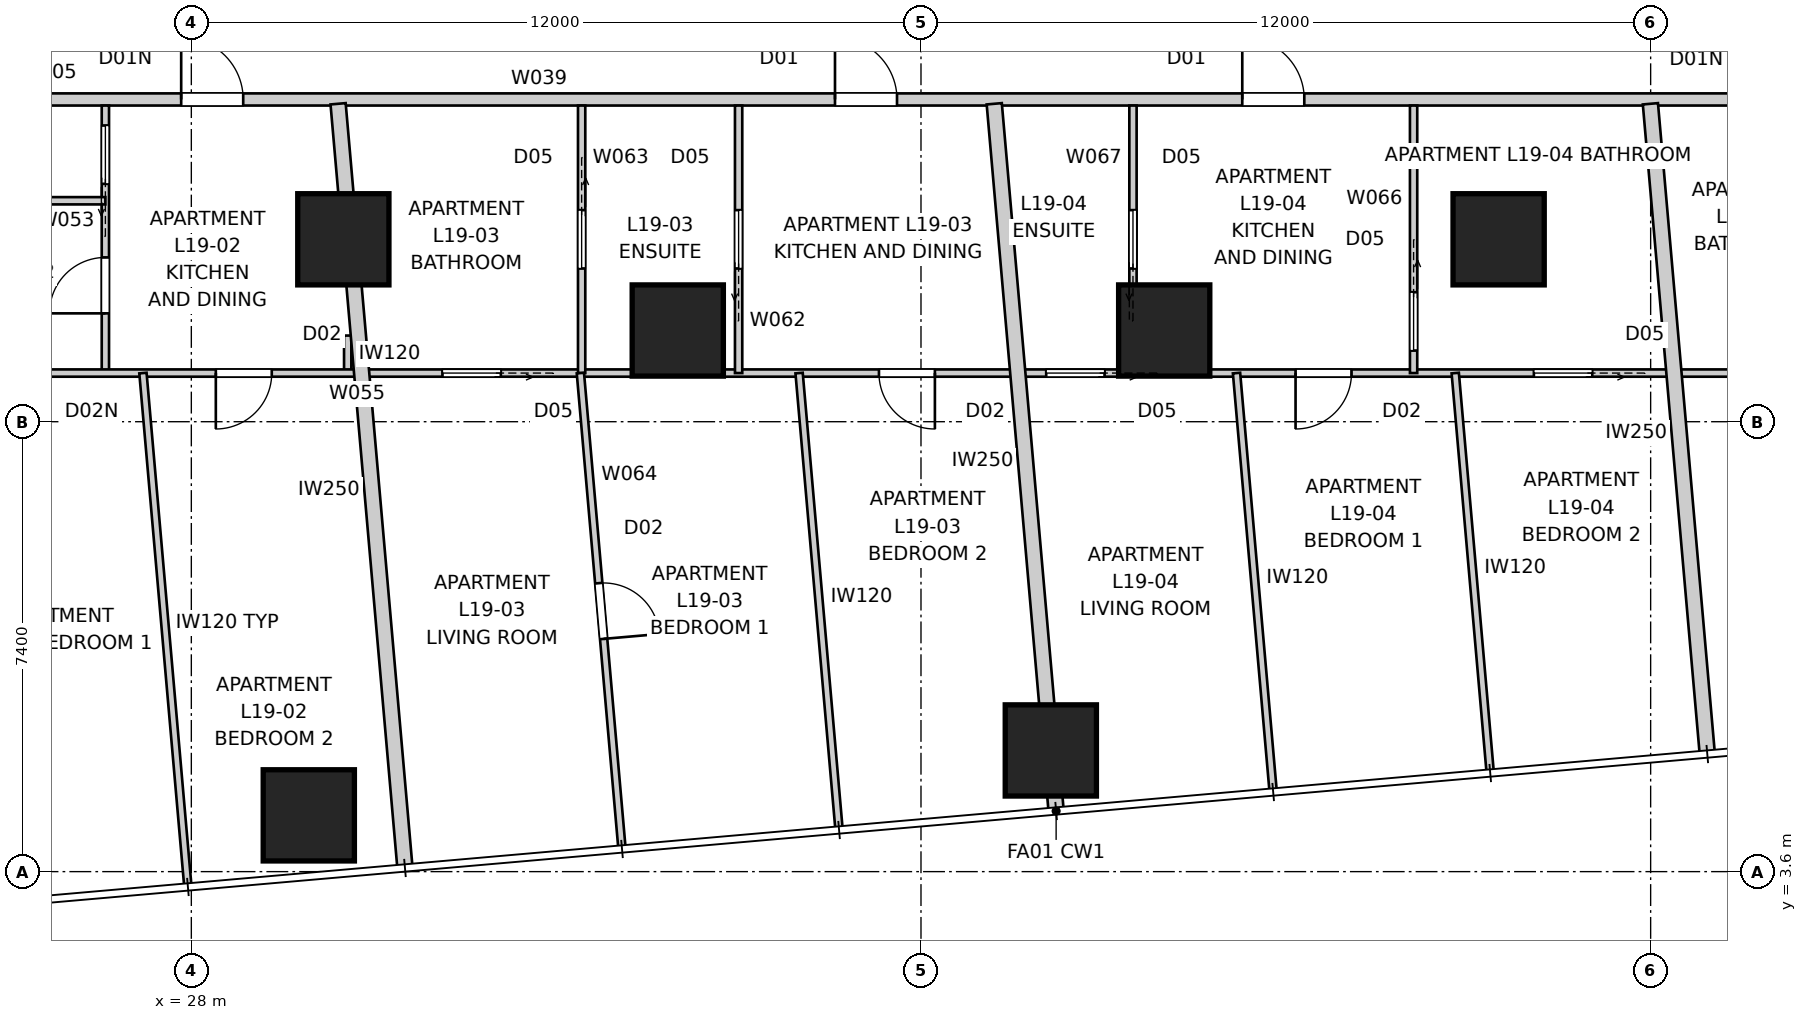
"""IFC4 building model, lengths in metres.
Left out: names, types, materials, properties, quantities, classifications, styles, units other than length and angle.
Written with IfcOpenShell. Run it as: python <this file> out.ifc"""

import sys

from ifc_helpers import new_model, si_unit, direction, frame, frame_2d, origin, origin_2d, place, context, subcontext, project, spatial, rectangle, extrude, element, fill, save


model = new_model("IFC4")
c1 = context("Model", 3, precision=1e-05, world=origin(), true_north=direction((0.0, 1.0)))
c2 = subcontext(c1, "Body", "Model", "MODEL_VIEW")
j1 = project(units=[si_unit("LENGTHUNIT", "METRE"), si_unit("PLANEANGLEUNIT", "RADIAN")], contexts=[c1])
p1 = place(None, origin())
s1 = spatial("IfcSite", under=j1, at=p1, CompositionType="ELEMENT")
p2 = place(p1, origin())
s2 = spatial("IfcBuilding", under=s1, at=p2, CompositionType="ELEMENT")
p3 = place(p2, frame((0.0, 0.0, 71.0)))
s3 = spatial("IfcBuildingStorey", under=s2, at=p3, CompositionType="ELEMENT", Elevation=71.0)
for number, where, z_axis, x_axis in (
    (1, (29.932, 4.526, 0.0), (0.0, 0.0, 1.0), (1.0, 0.0, 0.0)),
    (2, (42.135, 5.593, 0.0), (0.0, 0.0, 1.0), (1.0, 0.0, 0.0)),
):
    element("IfcColumn", number, at=place(p3, frame(where, z_axis=z_axis, x_axis=x_axis)), inside=s3, PredefinedType="COLUMN", context=c2, shape_type="SweptSolid", body=[
        extrude(rectangle(XDim=1.5, YDim=1.5, at=origin_2d()), origin(), (0.0, 0.0, 1.0), 3.2),
    ])
for number, where, z_axis, x_axis in (
    (3, (30.5, 14.0, 0.0), (0.0, 0.0, 1.0), (1.0, 0.0, 0.0)),
    (4, (36.0, 12.5, 0.0), (0.0, 0.0, 1.0), (1.0, 0.0, 0.0)),
    (5, (44.0, 12.5, 0.0), (0.0, 0.0, 1.0), (1.0, 0.0, 0.0)),
    (6, (49.5, 14.0, 0.0), (0.0, 0.0, 1.0), (1.0, 0.0, 0.0)),
):
    element("IfcColumn", number, at=place(p3, frame(where, z_axis=z_axis, x_axis=x_axis)), inside=s3, PredefinedType="COLUMN", context=c2, shape_type="SweptSolid", body=[
        extrude(rectangle(XDim=1.5, YDim=1.5, at=origin_2d()), origin(), (0.0, 0.0, 1.0), 3.4),
    ])
p4 = place(p3, frame((25.5, 16.3, 0.0), z_axis=(0.0, 0.0, 1.0), x_axis=(1.0, 0.0, 0.0)))
e7 = element("IfcWall", 7, at=p4, inside=s3, PredefinedType="PARTITIONING", context=c2, shape_type="SweptSolid", body=[
    extrude(rectangle(XDim=28.2, YDim=0.2, at=frame_2d((14.1, 0.0))), origin(), (0.0, 0.0, 1.0), 3.2),
])
p5 = place(p4, frame((19.784, 0.0, 0.0)))
e8 = element("IfcOpeningElement", 8, at=p5, cuts=e7, PredefinedType="OPENING", context=c2, shape_type="SweptSolid", body=[
    extrude(rectangle(XDim=1.02, YDim=2.34, at=frame_2d((0.51, 1.17))), frame((0.0, 0.11, 0.0), z_axis=(0.0, -1.0, 0.0), x_axis=(1.0, 0.0, 0.0)), (0.0, 0.0, 1.0), 0.22),
])
p6 = place(p4, frame((13.086, 0.0, 0.0)))
e9 = element("IfcOpeningElement", 9, at=p6, cuts=e7, PredefinedType="OPENING", context=c2, shape_type="SweptSolid", body=[
    extrude(rectangle(XDim=1.02, YDim=2.34, at=frame_2d((0.51, 1.17))), frame((0.0, 0.11, 0.0), z_axis=(0.0, -1.0, 0.0), x_axis=(1.0, 0.0, 0.0)), (0.0, 0.0, 1.0), 0.22),
])
p7 = place(p4, frame((2.333, 0.0, 0.0)))
e10 = element("IfcOpeningElement", 10, at=p7, cuts=e7, PredefinedType="OPENING", context=c2, shape_type="SweptSolid", body=[
    extrude(rectangle(XDim=1.02, YDim=2.0, at=frame_2d((0.51, 1.0))), frame((0.0, 0.11, 0.0), z_axis=(0.0, -1.0, 0.0), x_axis=(1.0, 0.0, 0.0)), (0.0, 0.0, 1.0), 0.22),
])
p8 = place(p3, frame((42.222, 4.597, 0.0), z_axis=(0.0, 0.0, 1.0), x_axis=(-0.087147497287, 0.996195419442, 0.0)))
e11 = element("IfcWall", 11, at=p8, inside=s3, PredefinedType="PARTITIONING", context=c2, shape_type="SweptSolid", body=[
    extrude(rectangle(XDim=11.677, YDim=0.25, at=frame_2d((5.838, 0.0))), origin(), (0.0, 0.0, 1.0), 3.2),
])
p9 = place(p3, frame((52.932, 5.534, 0.0), z_axis=(0.0, 0.0, 1.0), x_axis=(-0.08716441141, 0.996193939644, 0.0)))
e12 = element("IfcWall", 12, at=p9, inside=s3, PredefinedType="PARTITIONING", context=c2, shape_type="SweptSolid", body=[
    extrude(rectangle(XDim=10.736, YDim=0.25, at=frame_2d((5.368, 0.0))), origin(), (0.0, 0.0, 1.0), 3.2),
])
p10 = place(p3, frame((31.513, 3.66, 0.0), z_axis=(0.0, 0.0, 1.0), x_axis=(-0.087153988028, 0.996194851608, 0.0)))
e13 = element("IfcWall", 13, at=p10, inside=s3, PredefinedType="PARTITIONING", context=c2, shape_type="SweptSolid", body=[
    extrude(rectangle(XDim=12.617, YDim=0.25, at=frame_2d((6.309, 0.0))), origin(), (0.0, 0.0, 1.0), 3.2),
])
p11 = place(p3, frame((26.586, 11.8, 0.0), z_axis=(0.0, 0.0, 1.0), x_axis=(0.0, 1.0, 0.0)))
e14 = element("IfcWall", 14, at=p11, inside=s3, PredefinedType="PARTITIONING", context=c2, shape_type="SweptSolid", body=[
    extrude(rectangle(XDim=4.4, YDim=0.12, at=frame_2d((2.2, 0.0))), origin(), (0.0, 0.0, 1.0), 3.2),
])
p12 = place(p11, frame((0.982, 0.0, 0.0)))
e15 = element("IfcOpeningElement", 15, at=p12, cuts=e14, PredefinedType="OPENING", context=c2, shape_type="SweptSolid", body=[
    extrude(rectangle(XDim=0.92, YDim=2.0, at=frame_2d((0.46, 1.0))), frame((0.0, 0.07, 0.0), z_axis=(0.0, -1.0, 0.0), x_axis=(1.0, 0.0, 0.0)), (0.0, 0.0, 1.0), 0.14),
])
p13 = place(p11, frame((3.112, 0.0, 0.0)))
e16 = element("IfcOpeningElement", 16, at=p13, cuts=e14, PredefinedType="OPENING", context=c2, shape_type="SweptSolid", body=[
    extrude(rectangle(XDim=0.96, YDim=2.1, at=frame_2d((0.48, 1.05))), frame((0.0, 0.07, 0.0), z_axis=(0.0, -1.0, 0.0), x_axis=(1.0, 0.0, 0.0)), (0.0, 0.0, 1.0), 0.14),
])
p14 = place(p3, frame((30.572, 12.417, 0.0), z_axis=(0.0, 0.0, 1.0), x_axis=(0.0, -1.0, 0.0)))
e17 = element("IfcWall", 17, at=p14, inside=s3, PredefinedType="PARTITIONING", context=c2, shape_type="SweptSolid", body=[
    extrude(rectangle(XDim=0.617, YDim=0.12, at=frame_2d((0.308, 0.0))), origin(), (0.0, 0.0, 1.0), 3.2),
])
p15 = place(p3, frame((58.2, 11.8, 0.0), z_axis=(0.0, 0.0, 1.0), x_axis=(-1.0, 0.0, 0.0)))
e18 = element("IfcWall", 18, at=p15, inside=s3, PredefinedType="PARTITIONING", context=c2, shape_type="SweptSolid", body=[
    extrude(rectangle(XDim=36.4, YDim=0.12, at=frame_2d((18.2, 0.0))), origin(), (0.0, 0.0, 1.0), 3.2),
])
p16 = place(p15, frame((11.12, 0.0, 0.0)))
e19 = element("IfcOpeningElement", 19, at=p16, cuts=e18, PredefinedType="OPENING", context=c2, shape_type="SweptSolid", body=[
    extrude(rectangle(XDim=0.92, YDim=2.34, at=frame_2d((0.46, 1.17))), frame((0.0, 0.07, 0.0), z_axis=(0.0, -1.0, 0.0), x_axis=(1.0, 0.0, 0.0)), (0.0, 0.0, 1.0), 0.14),
])
p17 = place(p15, frame((17.971, 0.0, 0.0)))
e20 = element("IfcOpeningElement", 20, at=p17, cuts=e18, PredefinedType="OPENING", context=c2, shape_type="SweptSolid", body=[
    extrude(rectangle(XDim=0.92, YDim=2.34, at=frame_2d((0.46, 1.17))), frame((0.0, 0.07, 0.0), z_axis=(0.0, -1.0, 0.0), x_axis=(1.0, 0.0, 0.0)), (0.0, 0.0, 1.0), 0.14),
])
p18 = place(p15, frame((28.877, 0.0, 0.0)))
e21 = element("IfcOpeningElement", 21, at=p18, cuts=e18, PredefinedType="OPENING", context=c2, shape_type="SweptSolid", body=[
    extrude(rectangle(XDim=0.92, YDim=2.34, at=frame_2d((0.46, 1.17))), frame((0.0, 0.07, 0.0), z_axis=(0.0, -1.0, 0.0), x_axis=(1.0, 0.0, 0.0)), (0.0, 0.0, 1.0), 0.14),
])
p19 = place(p15, frame((7.16, 0.0, 0.0)))
e22 = element("IfcOpeningElement", 22, at=p19, cuts=e18, PredefinedType="OPENING", context=c2, shape_type="SweptSolid", body=[
    extrude(rectangle(XDim=0.96, YDim=2.1, at=frame_2d((0.48, 1.05))), frame((0.0, 0.07, 0.0), z_axis=(0.0, -1.0, 0.0), x_axis=(1.0, 0.0, 0.0)), (0.0, 0.0, 1.0), 0.14),
])
p20 = place(p15, frame((15.181, 0.0, 0.0)))
e23 = element("IfcOpeningElement", 23, at=p20, cuts=e18, PredefinedType="OPENING", context=c2, shape_type="SweptSolid", body=[
    extrude(rectangle(XDim=0.96, YDim=2.1, at=frame_2d((0.48, 1.05))), frame((0.0, 0.07, 0.0), z_axis=(0.0, -1.0, 0.0), x_axis=(1.0, 0.0, 0.0)), (0.0, 0.0, 1.0), 0.14),
])
p21 = place(p15, frame((32.668, 0.0, 0.0)))
e24 = element("IfcOpeningElement", 24, at=p21, cuts=e18, PredefinedType="OPENING", context=c2, shape_type="SweptSolid", body=[
    extrude(rectangle(XDim=0.92, YDim=2.0, at=frame_2d((0.46, 1.0))), frame((0.0, 0.07, 0.0), z_axis=(0.0, -1.0, 0.0), x_axis=(1.0, 0.0, 0.0)), (0.0, 0.0, 1.0), 0.14),
])
p22 = place(p15, frame((35.011, 0.0, 0.0)))
e25 = element("IfcOpeningElement", 25, at=p22, cuts=e18, PredefinedType="OPENING", context=c2, shape_type="SweptSolid", body=[
    extrude(rectangle(XDim=0.92, YDim=2.34, at=frame_2d((0.46, 1.17))), frame((0.0, 0.07, 0.0), z_axis=(0.0, -1.0, 0.0), x_axis=(1.0, 0.0, 0.0)), (0.0, 0.0, 1.0), 0.14),
])
p23 = place(p15, frame((0.675, 0.0, 0.0)))
e26 = element("IfcOpeningElement", 26, at=p23, cuts=e18, PredefinedType="OPENING", context=c2, shape_type="SweptSolid", body=[
    extrude(rectangle(XDim=0.92, YDim=2.34, at=frame_2d((0.46, 1.17))), frame((0.0, 0.07, 0.0), z_axis=(0.0, -1.0, 0.0), x_axis=(1.0, 0.0, 0.0)), (0.0, 0.0, 1.0), 0.14),
])
p24 = place(p15, frame((25.11, 0.0, 0.0)))
e27 = element("IfcOpeningElement", 27, at=p24, cuts=e18, PredefinedType="OPENING", context=c2, shape_type="SweptSolid", body=[
    extrude(rectangle(XDim=0.96, YDim=2.1, at=frame_2d((0.48, 1.05))), frame((0.0, 0.07, 0.0), z_axis=(0.0, -1.0, 0.0), x_axis=(1.0, 0.0, 0.0)), (0.0, 0.0, 1.0), 0.14),
])
p25 = place(p15, frame((3.904, 0.0, 0.0)))
e28 = element("IfcOpeningElement", 28, at=p25, cuts=e18, PredefinedType="OPENING", context=c2, shape_type="SweptSolid", body=[
    extrude(rectangle(XDim=0.96, YDim=2.1, at=frame_2d((0.48, 1.05))), frame((0.0, 0.07, 0.0), z_axis=(0.0, -1.0, 0.0), x_axis=(1.0, 0.0, 0.0)), (0.0, 0.0, 1.0), 0.14),
])
p26 = place(p3, frame((26.586, 14.634, 0.0), z_axis=(0.0, 0.0, 1.0), x_axis=(-1.0, 0.0, 0.0)))
e29 = element("IfcWall", 29, at=p26, inside=s3, PredefinedType="PARTITIONING", context=c2, shape_type="SweptSolid", body=[
    extrude(rectangle(XDim=4.786, YDim=0.12, at=frame_2d((2.393, 0.0))), origin(), (0.0, 0.0, 1.0), 2.399),
])
p27 = place(p3, frame((27.204, 11.8, 0.0), z_axis=(0.0, 0.0, 1.0), x_axis=(0.087167308925, -0.996193686115, 0.0)))
e30 = element("IfcWall", 30, at=p27, inside=s3, PredefinedType="PARTITIONING", context=c2, shape_type="SweptSolid", body=[
    extrude(rectangle(XDim=8.445, YDim=0.12, at=frame_2d((4.222, 0.0))), origin(), (0.0, 0.0, 1.0), 2.399),
])
p28 = place(p3, frame((37.0, 11.8, 0.0), z_axis=(0.0, 0.0, 1.0), x_axis=(0.0, 1.0, 0.0)))
e31 = element("IfcWall", 31, at=p28, inside=s3, PredefinedType="PARTITIONING", context=c2, shape_type="SweptSolid", body=[
    extrude(rectangle(XDim=4.4, YDim=0.12, at=frame_2d((2.2, 0.0))), origin(), (0.0, 0.0, 1.0), 2.672),
])
p29 = place(p28, frame((1.72, 0.0, 0.0)))
e32 = element("IfcOpeningElement", 32, at=p29, cuts=e31, PredefinedType="OPENING", context=c2, shape_type="SweptSolid", body=[
    extrude(rectangle(XDim=0.96, YDim=2.1, at=frame_2d((0.48, 1.05))), frame((0.0, 0.07, 0.0), z_axis=(0.0, -1.0, 0.0), x_axis=(1.0, 0.0, 0.0)), (0.0, 0.0, 1.0), 0.14),
])
p30 = place(p3, frame((34.419, 16.2, 0.0), z_axis=(0.0, 0.0, 1.0), x_axis=(0.0, -1.0, 0.0)))
e33 = element("IfcWall", 33, at=p30, inside=s3, PredefinedType="PARTITIONING", context=c2, shape_type="SweptSolid", body=[
    extrude(rectangle(XDim=4.4, YDim=0.12, at=frame_2d((2.2, 0.0))), origin(), (0.0, 0.0, 1.0), 2.588),
])
p31 = place(p30, frame((1.72, 0.0, 0.0)))
e34 = element("IfcOpeningElement", 34, at=p31, cuts=e33, PredefinedType="OPENING", context=c2, shape_type="SweptSolid", body=[
    extrude(rectangle(XDim=0.96, YDim=2.1, at=frame_2d((0.48, 1.05))), frame((0.0, 0.07, 0.0), z_axis=(0.0, -1.0, 0.0), x_axis=(1.0, 0.0, 0.0)), (0.0, 0.0, 1.0), 0.14),
])
p32 = place(p3, frame((34.398, 11.8, 0.0), z_axis=(0.0, 0.0, 1.0), x_axis=(0.087161914023, -0.996194158156, 0.0)))
e35 = element("IfcWall", 35, at=p32, inside=s3, PredefinedType="PARTITIONING", context=c2, shape_type="SweptSolid", body=[
    extrude(rectangle(XDim=7.818, YDim=0.12, at=frame_2d((3.909, 0.0))), origin(), (0.0, 0.0, 1.0), 2.588),
])
p33 = place(p32, frame((3.469, 0.0, 0.0)))
e36 = element("IfcOpeningElement", 36, at=p33, cuts=e35, PredefinedType="OPENING", context=c2, shape_type="SweptSolid", body=[
    extrude(rectangle(XDim=0.92, YDim=2.34, at=frame_2d((0.46, 1.17))), frame((0.0, 0.07, 0.0), z_axis=(0.0, -1.0, 0.0), x_axis=(1.0, 0.0, 0.0)), (0.0, 0.0, 1.0), 0.14),
])
p34 = place(p3, frame((37.995, 11.8, 0.0), z_axis=(0.0, 0.0, 1.0), x_axis=(0.08715887855, -0.99619442374, 0.0)))
e37 = element("IfcWall", 37, at=p34, inside=s3, PredefinedType="PARTITIONING", context=c2, shape_type="SweptSolid", body=[
    extrude(rectangle(XDim=7.504, YDim=0.12, at=frame_2d((3.752, 0.0))), origin(), (0.0, 0.0, 1.0), 3.2),
])
p35 = place(p3, frame((48.101, 16.2, 0.0), z_axis=(0.0, 0.0, 1.0), x_axis=(0.0, -1.0, 0.0)))
e38 = element("IfcWall", 38, at=p35, inside=s3, PredefinedType="PARTITIONING", context=c2, shape_type="SweptSolid", body=[
    extrude(rectangle(XDim=4.4, YDim=0.12, at=frame_2d((2.2, 0.0))), origin(), (0.0, 0.0, 1.0), 3.2),
])
p36 = place(p35, frame((3.07, 0.0, 0.0)))
e39 = element("IfcOpeningElement", 39, at=p36, cuts=e38, PredefinedType="OPENING", context=c2, shape_type="SweptSolid", body=[
    extrude(rectangle(XDim=0.96, YDim=2.1, at=frame_2d((0.48, 1.05))), frame((0.0, 0.07, 0.0), z_axis=(0.0, -1.0, 0.0), x_axis=(1.0, 0.0, 0.0)), (0.0, 0.0, 1.0), 0.14),
])
p37 = place(p3, frame((43.486, 11.8, 0.0), z_axis=(0.0, 0.0, 1.0), x_axis=(0.0, 1.0, 0.0)))
e40 = element("IfcWall", 40, at=p37, inside=s3, PredefinedType="PARTITIONING", context=c2, shape_type="SweptSolid", body=[
    extrude(rectangle(XDim=4.4, YDim=0.12, at=frame_2d((2.2, 0.0))), origin(), (0.0, 0.0, 1.0), 3.2),
])
p38 = place(p37, frame((1.72, 0.0, 0.0)))
e41 = element("IfcOpeningElement", 41, at=p38, cuts=e40, PredefinedType="OPENING", context=c2, shape_type="SweptSolid", body=[
    extrude(rectangle(XDim=0.96, YDim=2.1, at=frame_2d((0.48, 1.05))), frame((0.0, 0.07, 0.0), z_axis=(0.0, -1.0, 0.0), x_axis=(1.0, 0.0, 0.0)), (0.0, 0.0, 1.0), 0.14),
])
p39 = place(p3, frame((45.189, 11.8, 0.0), z_axis=(0.0, 0.0, 1.0), x_axis=(0.087190290923, -0.996191674914, 0.0)))
e42 = element("IfcWall", 42, at=p39, inside=s3, PredefinedType="PARTITIONING", context=c2, shape_type="SweptSolid", body=[
    extrude(rectangle(XDim=6.877, YDim=0.12, at=frame_2d((3.438, 0.0))), origin(), (0.0, 0.0, 1.0), 3.2),
])
p40 = place(p3, frame((48.786, 11.8, 0.0), z_axis=(0.0, 0.0, 1.0), x_axis=(0.087151261897, -0.996195090105, 0.0)))
e43 = element("IfcWall", 43, at=p40, inside=s3, PredefinedType="PARTITIONING", context=c2, shape_type="SweptSolid", body=[
    extrude(rectangle(XDim=6.563, YDim=0.12, at=frame_2d((3.282, 0.0))), origin(), (0.0, 0.0, 1.0), 3.2),
])
p41 = place(p5, origin())
e44 = element("IfcDoor", 44, at=p41, inside=s3, OperationType="SINGLE_SWING_LEFT", PredefinedType="DOOR", context=c2, shape_type="SweptSolid", body=[
    extrude(rectangle(XDim=1.02, YDim=2.34, at=frame_2d((0.51, 1.17))), frame((0.0, 0.025, 0.0), z_axis=(0.0, -1.0, 0.0), x_axis=(1.0, 0.0, 0.0)), (0.0, 0.0, 1.0), 0.05),
])
fill(e8, e44)
p42 = place(p6, origin())
e45 = element("IfcDoor", 45, at=p42, inside=s3, OperationType="SINGLE_SWING_LEFT", PredefinedType="DOOR", context=c2, shape_type="SweptSolid", body=[
    extrude(rectangle(XDim=1.02, YDim=2.34, at=frame_2d((0.51, 1.17))), frame((0.0, 0.025, 0.0), z_axis=(0.0, -1.0, 0.0), x_axis=(1.0, 0.0, 0.0)), (0.0, 0.0, 1.0), 0.05),
])
fill(e9, e45)
p43 = place(p7, origin())
e46 = element("IfcDoor", 46, at=p43, inside=s3, OperationType="SINGLE_SWING_LEFT", PredefinedType="DOOR", context=c2, shape_type="SweptSolid", body=[
    extrude(rectangle(XDim=1.02, YDim=2.0, at=frame_2d((0.51, 1.0))), frame((0.0, 0.025, 0.0), z_axis=(0.0, -1.0, 0.0), x_axis=(1.0, 0.0, 0.0)), (0.0, 0.0, 1.0), 0.05),
])
fill(e10, e46)
p44 = place(p36, origin())
e47 = element("IfcDoor", 47, at=p44, inside=s3, OperationType="SLIDING_TO_LEFT", PredefinedType="DOOR", context=c2, shape_type="SweptSolid", body=[
    extrude(rectangle(XDim=0.96, YDim=2.1, at=frame_2d((0.48, 1.05))), frame((0.0, 0.025, 0.0), z_axis=(0.0, -1.0, 0.0), x_axis=(1.0, 0.0, 0.0)), (0.0, 0.0, 1.0), 0.05),
])
fill(e39, e47)
p45 = place(p38, origin())
e48 = element("IfcDoor", 48, at=p45, inside=s3, OperationType="SLIDING_TO_LEFT", PredefinedType="DOOR", context=c2, shape_type="SweptSolid", body=[
    extrude(rectangle(XDim=0.96, YDim=2.1, at=frame_2d((0.48, 1.05))), frame((0.0, 0.025, 0.0), z_axis=(0.0, -1.0, 0.0), x_axis=(1.0, 0.0, 0.0)), (0.0, 0.0, 1.0), 0.05),
])
fill(e41, e48)
p46 = place(p16, origin())
e49 = element("IfcDoor", 49, at=p46, inside=s3, OperationType="SINGLE_SWING_RIGHT", PredefinedType="DOOR", context=c2, shape_type="SweptSolid", body=[
    extrude(rectangle(XDim=0.92, YDim=2.34, at=frame_2d((0.46, 1.17))), frame((0.0, 0.025, 0.0), z_axis=(0.0, -1.0, 0.0), x_axis=(1.0, 0.0, 0.0)), (0.0, 0.0, 1.0), 0.05),
])
fill(e19, e49)
p47 = place(p29, origin())
e50 = element("IfcDoor", 50, at=p47, inside=s3, OperationType="SLIDING_TO_LEFT", PredefinedType="DOOR", context=c2, shape_type="SweptSolid", body=[
    extrude(rectangle(XDim=0.96, YDim=2.1, at=frame_2d((0.48, 1.05))), frame((0.0, 0.025, 0.0), z_axis=(0.0, -1.0, 0.0), x_axis=(1.0, 0.0, 0.0)), (0.0, 0.0, 1.0), 0.05),
])
fill(e32, e50)
p48 = place(p17, origin())
e51 = element("IfcDoor", 51, at=p48, inside=s3, OperationType="SINGLE_SWING_LEFT", PredefinedType="DOOR", context=c2, shape_type="SweptSolid", body=[
    extrude(rectangle(XDim=0.92, YDim=2.34, at=frame_2d((0.46, 1.17))), frame((0.0, 0.025, 0.0), z_axis=(0.0, -1.0, 0.0), x_axis=(1.0, 0.0, 0.0)), (0.0, 0.0, 1.0), 0.05),
])
fill(e20, e51)
p49 = place(p18, origin())
e52 = element("IfcDoor", 52, at=p49, inside=s3, OperationType="SINGLE_SWING_RIGHT", PredefinedType="DOOR", context=c2, shape_type="SweptSolid", body=[
    extrude(rectangle(XDim=0.92, YDim=2.34, at=frame_2d((0.46, 1.17))), frame((0.0, 0.025, 0.0), z_axis=(0.0, -1.0, 0.0), x_axis=(1.0, 0.0, 0.0)), (0.0, 0.0, 1.0), 0.05),
])
fill(e21, e52)
p50 = place(p12, origin())
e53 = element("IfcDoor", 53, at=p50, inside=s3, OperationType="SINGLE_SWING_LEFT", PredefinedType="DOOR", context=c2, shape_type="SweptSolid", body=[
    extrude(rectangle(XDim=0.92, YDim=2.0, at=frame_2d((0.46, 1.0))), frame((0.0, 0.025, 0.0), z_axis=(0.0, -1.0, 0.0), x_axis=(1.0, 0.0, 0.0)), (0.0, 0.0, 1.0), 0.05),
])
fill(e15, e53)
p51 = place(p13, origin())
e54 = element("IfcDoor", 54, at=p51, inside=s3, OperationType="SLIDING_TO_LEFT", PredefinedType="DOOR", context=c2, shape_type="SweptSolid", body=[
    extrude(rectangle(XDim=0.96, YDim=2.1, at=frame_2d((0.48, 1.05))), frame((0.0, 0.025, 0.0), z_axis=(0.0, -1.0, 0.0), x_axis=(1.0, 0.0, 0.0)), (0.0, 0.0, 1.0), 0.05),
])
fill(e16, e54)
p52 = place(p19, origin())
e55 = element("IfcDoor", 55, at=p52, inside=s3, OperationType="SLIDING_TO_LEFT", PredefinedType="DOOR", context=c2, shape_type="SweptSolid", body=[
    extrude(rectangle(XDim=0.96, YDim=2.1, at=frame_2d((0.48, 1.05))), frame((0.0, 0.025, 0.0), z_axis=(0.0, -1.0, 0.0), x_axis=(1.0, 0.0, 0.0)), (0.0, 0.0, 1.0), 0.05),
])
fill(e22, e55)
p53 = place(p20, origin())
e56 = element("IfcDoor", 56, at=p53, inside=s3, OperationType="SLIDING_TO_LEFT", PredefinedType="DOOR", context=c2, shape_type="SweptSolid", body=[
    extrude(rectangle(XDim=0.96, YDim=2.1, at=frame_2d((0.48, 1.05))), frame((0.0, 0.025, 0.0), z_axis=(0.0, -1.0, 0.0), x_axis=(1.0, 0.0, 0.0)), (0.0, 0.0, 1.0), 0.05),
])
fill(e23, e56)
p54 = place(p31, origin())
e57 = element("IfcDoor", 57, at=p54, inside=s3, OperationType="SLIDING_TO_LEFT", PredefinedType="DOOR", context=c2, shape_type="SweptSolid", body=[
    extrude(rectangle(XDim=0.96, YDim=2.1, at=frame_2d((0.48, 1.05))), frame((0.0, 0.025, 0.0), z_axis=(0.0, -1.0, 0.0), x_axis=(1.0, 0.0, 0.0)), (0.0, 0.0, 1.0), 0.05),
])
fill(e34, e57)
p55 = place(p24, origin())
e58 = element("IfcDoor", 58, at=p55, inside=s3, OperationType="SLIDING_TO_LEFT", PredefinedType="DOOR", context=c2, shape_type="SweptSolid", body=[
    extrude(rectangle(XDim=0.96, YDim=2.1, at=frame_2d((0.48, 1.05))), frame((0.0, 0.025, 0.0), z_axis=(0.0, -1.0, 0.0), x_axis=(1.0, 0.0, 0.0)), (0.0, 0.0, 1.0), 0.05),
])
fill(e27, e58)
p56 = place(p33, origin())
e59 = element("IfcDoor", 59, at=p56, inside=s3, OperationType="SINGLE_SWING_RIGHT", PredefinedType="DOOR", context=c2, shape_type="SweptSolid", body=[
    extrude(rectangle(XDim=0.92, YDim=2.34, at=frame_2d((0.46, 1.17))), frame((0.0, 0.025, 0.0), z_axis=(0.0, -1.0, 0.0), x_axis=(1.0, 0.0, 0.0)), (0.0, 0.0, 1.0), 0.05),
])
fill(e36, e59)
save(model, sys.argv[1])
